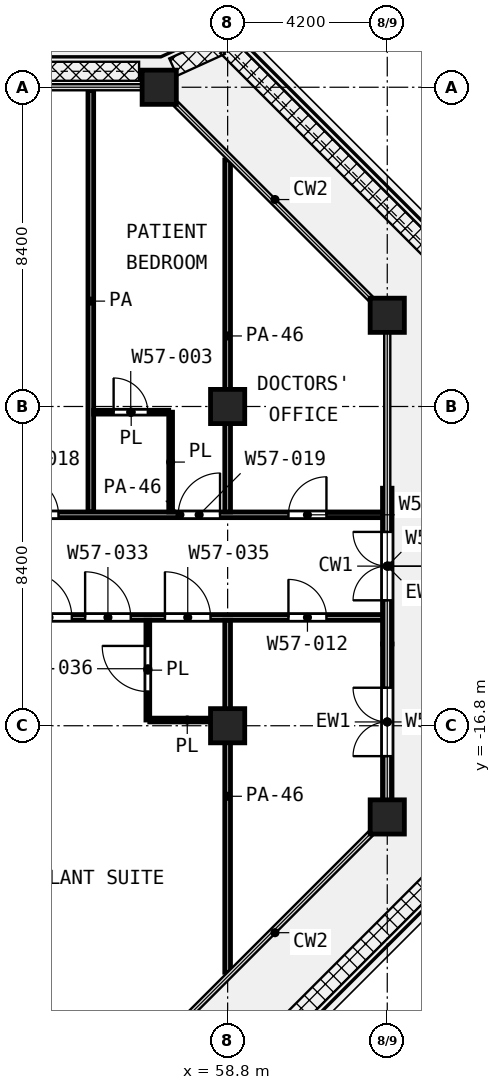
"""IFC4 building model, lengths in metres.
Left out: names, types, materials, properties, quantities, classifications, styles, units other than length and angle.
Written with IfcOpenShell. Run it as: python <this file> out.ifc"""

import sys

from ifc_helpers import new_model, si_unit, direction, frame, frame_2d, origin, origin_2d, place, context, subcontext, project, spatial, rectangle, extrude, element, fill, save


model = new_model("IFC4")
c1 = context("Model", 3, precision=1e-05, world=origin(), true_north=direction((0.0, 1.0)))
c2 = subcontext(c1, "Body", "Model", "MODEL_VIEW")
j1 = project(units=[si_unit("LENGTHUNIT", "METRE"), si_unit("PLANEANGLEUNIT", "RADIAN")], contexts=[c1])
p1 = place(None, origin())
s1 = spatial("IfcSite", under=j1, at=p1, CompositionType="ELEMENT")
p2 = place(p1, origin())
s2 = spatial("IfcBuilding", under=s1, at=p2, CompositionType="ELEMENT")
p3 = place(p2, frame((0.0, 0.0, 247.4)))
s3 = spatial("IfcBuildingStorey", under=s2, at=p3, CompositionType="ELEMENT", Elevation=247.4)
for number, where, z_axis, x_axis in (
    (1, (57.0, 0.0, 0.0), (0.0, 0.0, 1.0), (1.0, 0.0, 0.0)),
    (2, (63.0, -6.0, 0.0), (0.0, 0.0, 1.0), (1.0, 0.0, 0.0)),
    (3, (58.8, -8.4, 0.0), (0.0, 0.0, 1.0), (1.0, 0.0, 0.0)),
    (4, (58.8, -16.8, 0.0), (0.0, 0.0, 1.0), (1.0, 0.0, 0.0)),
    (5, (63.0, -19.2, 0.0), (0.0, 0.0, 1.0), (1.0, 0.0, 0.0)),
):
    element("IfcColumn", number, at=place(p3, frame(where, z_axis=z_axis, x_axis=x_axis)), inside=s3, PredefinedType="COLUMN", context=c2, shape_type="SweptSolid", body=[
        extrude(rectangle(XDim=0.9, YDim=0.9, at=origin_2d()), origin(), (0.0, 0.0, 1.0), 4.2),
    ])
p4 = place(p3, frame((63.0, -18.75, 0.0), z_axis=(0.0, 0.0, 1.0), x_axis=(0.0, 1.0, 0.0)))
e6 = element("IfcWall", 6, at=p4, inside=s3, PredefinedType="SOLIDWALL", context=c2, shape_type="SweptSolid", body=[
    extrude(rectangle(XDim=4.1, YDim=0.25, at=frame_2d((2.05, 0.0))), origin(), (0.0, 0.0, 1.0), 2.58),
])
p5 = place(p4, frame((1.15, 0.0, 0.0)))
e7 = element("IfcOpeningElement", 7, at=p5, cuts=e6, PredefinedType="OPENING", context=c2, shape_type="SweptSolid", body=[
    extrude(rectangle(XDim=1.8, YDim=2.1, at=frame_2d((0.9, 1.05))), frame((0.0, 0.135, 0.0), z_axis=(0.0, -1.0, 0.0), x_axis=(1.0, 0.0, 0.0)), (0.0, 0.0, 1.0), 0.27),
])
p6 = place(p3, frame((63.0, -14.65, 0.0), z_axis=(0.0, 0.0, 1.0), x_axis=(0.0, 1.0, 0.0)))
e8 = element("IfcWall", 8, at=p6, inside=s3, PredefinedType="SOLIDWALL", context=c2, shape_type="SweptSolid", body=[
    extrude(rectangle(XDim=4.1, YDim=0.25, at=frame_2d((2.05, 0.0))), origin(), (0.0, 0.0, 1.0), 2.58),
])
p7 = place(p6, frame((1.15, 0.0, 0.0)))
e9 = element("IfcOpeningElement", 9, at=p7, cuts=e8, PredefinedType="OPENING", context=c2, shape_type="SweptSolid", body=[
    extrude(rectangle(XDim=1.8, YDim=2.1, at=frame_2d((0.9, 1.05))), frame((0.0, 0.135, 0.0), z_axis=(0.0, -1.0, 0.0), x_axis=(1.0, 0.0, 0.0)), (0.0, 0.0, 1.0), 0.27),
])
p8 = place(p3, frame((56.75, -16.65, 0.0), z_axis=(0.0, 0.0, 1.0), x_axis=(1.0, 0.0, 0.0)))
e10 = element("IfcWall", 10, at=p8, inside=s3, PredefinedType="PARTITIONING", context=c2, shape_type="SweptSolid", body=[
    extrude(rectangle(XDim=1.975, YDim=0.1, at=frame_2d((0.988, 0.0))), origin(), (0.0, 0.0, 1.0), 3.6),
])
p9 = place(p3, frame((55.275, -8.55, 0.0), z_axis=(0.0, 0.0, 1.0), x_axis=(1.0, 0.0, 0.0)))
e11 = element("IfcWall", 11, at=p9, inside=s3, PredefinedType="PARTITIONING", context=c2, shape_type="SweptSolid", body=[
    extrude(rectangle(XDim=1.975, YDim=0.1, at=frame_2d((0.988, 0.0))), origin(), (0.0, 0.0, 1.0), 3.6),
])
p10 = place(p9, frame((0.525, 0.0, 0.0)))
e12 = element("IfcOpeningElement", 12, at=p10, cuts=e11, PredefinedType="OPENING", context=c2, shape_type="SweptSolid", body=[
    extrude(rectangle(XDim=0.9, YDim=2.1, at=frame_2d((0.45, 1.05))), frame((0.0, 0.06, 0.0), z_axis=(0.0, -1.0, 0.0), x_axis=(1.0, 0.0, 0.0)), (0.0, 0.0, 1.0), 0.12),
])
p11 = place(p3, frame((56.7, -16.65, 0.0), z_axis=(0.0, 0.0, 1.0), x_axis=(0.0, 1.0, 0.0)))
e13 = element("IfcWall", 13, at=p11, inside=s3, PredefinedType="PARTITIONING", context=c2, shape_type="SweptSolid", body=[
    extrude(rectangle(XDim=2.625, YDim=0.1, at=frame_2d((1.312, 0.0))), origin(), (0.0, 0.0, 1.0), 3.6),
])
p12 = place(p11, frame((0.75, 0.0, 0.0)))
e14 = element("IfcOpeningElement", 14, at=p12, cuts=e13, PredefinedType="OPENING", context=c2, shape_type="SweptSolid", body=[
    extrude(rectangle(XDim=1.2, YDim=2.1, at=frame_2d((0.6, 1.05))), frame((0.0, 0.06, 0.0), z_axis=(0.0, -1.0, 0.0), x_axis=(1.0, 0.0, 0.0)), (0.0, 0.0, 1.0), 0.12),
])
p13 = place(p3, frame((57.3, -11.175, 0.0), z_axis=(0.0, 0.0, 1.0), x_axis=(0.0, 1.0, 0.0)))
e15 = element("IfcWall", 15, at=p13, inside=s3, PredefinedType="PARTITIONING", context=c2, shape_type="SweptSolid", body=[
    extrude(rectangle(XDim=2.625, YDim=0.1, at=frame_2d((1.312, 0.0))), origin(), (0.0, 0.0, 1.0), 3.6),
])
p14 = place(p3, frame((29.4, -13.95, 0.0), z_axis=(0.0, 0.0, 1.0), x_axis=(1.0, 0.0, 0.0)))
e16 = element("IfcWall", 16, at=p14, inside=s3, PredefinedType="PARTITIONING", context=c2, shape_type="SweptSolid", body=[
    extrude(rectangle(XDim=33.52, YDim=0.15, at=frame_2d((16.76, 0.0))), origin(), (0.0, 0.0, 1.0), 2.7),
])
p15 = place(p14, frame((1.5, 0.0, 0.0)))
e17 = element("IfcOpeningElement", 17, at=p15, cuts=e16, PredefinedType="OPENING", context=c2, shape_type="SweptSolid", body=[
    extrude(rectangle(XDim=1.2, YDim=2.1, at=frame_2d((0.6, 1.05))), frame((0.0, 0.085, 0.0), z_axis=(0.0, -1.0, 0.0), x_axis=(1.0, 0.0, 0.0)), (0.0, 0.0, 1.0), 0.17),
])
p16 = place(p14, frame((8.85, 0.0, 0.0)))
e18 = element("IfcOpeningElement", 18, at=p16, cuts=e16, PredefinedType="OPENING", context=c2, shape_type="SweptSolid", body=[
    extrude(rectangle(XDim=1.2, YDim=2.1, at=frame_2d((0.6, 1.05))), frame((0.0, 0.085, 0.0), z_axis=(0.0, -1.0, 0.0), x_axis=(1.0, 0.0, 0.0)), (0.0, 0.0, 1.0), 0.17),
])
p17 = place(p14, frame((7.3, 0.0, 0.0)))
e19 = element("IfcOpeningElement", 19, at=p17, cuts=e16, PredefinedType="OPENING", context=c2, shape_type="SweptSolid", body=[
    extrude(rectangle(XDim=1.2, YDim=2.1, at=frame_2d((0.6, 1.05))), frame((0.0, 0.085, 0.0), z_axis=(0.0, -1.0, 0.0), x_axis=(1.0, 0.0, 0.0)), (0.0, 0.0, 1.0), 0.17),
])
p18 = place(p14, frame((10.95, 0.0, 0.0)))
e20 = element("IfcOpeningElement", 20, at=p18, cuts=e16, PredefinedType="OPENING", context=c2, shape_type="SweptSolid", body=[
    extrude(rectangle(XDim=1.2, YDim=2.1, at=frame_2d((0.6, 1.05))), frame((0.0, 0.085, 0.0), z_axis=(0.0, -1.0, 0.0), x_axis=(1.0, 0.0, 0.0)), (0.0, 0.0, 1.0), 0.17),
])
p19 = place(p14, frame((13.8, 0.0, 0.0)))
e21 = element("IfcOpeningElement", 21, at=p19, cuts=e16, PredefinedType="OPENING", context=c2, shape_type="SweptSolid", body=[
    extrude(rectangle(XDim=1.2, YDim=2.1, at=frame_2d((0.6, 1.05))), frame((0.0, 0.085, 0.0), z_axis=(0.0, -1.0, 0.0), x_axis=(1.0, 0.0, 0.0)), (0.0, 0.0, 1.0), 0.17),
])
p20 = place(p14, frame((19.7, 0.0, 0.0)))
e22 = element("IfcOpeningElement", 22, at=p20, cuts=e16, PredefinedType="OPENING", context=c2, shape_type="SweptSolid", body=[
    extrude(rectangle(XDim=1.1, YDim=2.1, at=frame_2d((0.55, 1.05))), frame((0.0, 0.085, 0.0), z_axis=(0.0, -1.0, 0.0), x_axis=(1.0, 0.0, 0.0)), (0.0, 0.0, 1.0), 0.17),
])
p21 = place(p14, frame((25.65, 0.0, 0.0)))
e23 = element("IfcOpeningElement", 23, at=p21, cuts=e16, PredefinedType="OPENING", context=c2, shape_type="SweptSolid", body=[
    extrude(rectangle(XDim=1.2, YDim=2.1, at=frame_2d((0.6, 1.05))), frame((0.0, 0.085, 0.0), z_axis=(0.0, -1.0, 0.0), x_axis=(1.0, 0.0, 0.0)), (0.0, 0.0, 1.0), 0.17),
])
p22 = place(p14, frame((24.1, 0.0, 0.0)))
e24 = element("IfcOpeningElement", 24, at=p22, cuts=e16, PredefinedType="OPENING", context=c2, shape_type="SweptSolid", body=[
    extrude(rectangle(XDim=1.2, YDim=2.1, at=frame_2d((0.6, 1.05))), frame((0.0, 0.085, 0.0), z_axis=(0.0, -1.0, 0.0), x_axis=(1.0, 0.0, 0.0)), (0.0, 0.0, 1.0), 0.17),
])
p23 = place(p14, frame((27.75, 0.0, 0.0)))
e25 = element("IfcOpeningElement", 25, at=p23, cuts=e16, PredefinedType="OPENING", context=c2, shape_type="SweptSolid", body=[
    extrude(rectangle(XDim=1.2, YDim=2.1, at=frame_2d((0.6, 1.05))), frame((0.0, 0.085, 0.0), z_axis=(0.0, -1.0, 0.0), x_axis=(1.0, 0.0, 0.0)), (0.0, 0.0, 1.0), 0.17),
])
p24 = place(p14, frame((31.0, 0.0, 0.0)))
e26 = element("IfcOpeningElement", 26, at=p24, cuts=e16, PredefinedType="OPENING", context=c2, shape_type="SweptSolid", body=[
    extrude(rectangle(XDim=1.0, YDim=2.1, at=frame_2d((0.5, 1.05))), frame((0.0, 0.085, 0.0), z_axis=(0.0, -1.0, 0.0), x_axis=(1.0, 0.0, 0.0)), (0.0, 0.0, 1.0), 0.17),
])
p25 = place(p3, frame((52.168, -11.25, 0.0), z_axis=(0.0, 0.0, 1.0), x_axis=(1.0, 0.0, 0.0)))
e27 = element("IfcWall", 27, at=p25, inside=s3, PredefinedType="PARTITIONING", context=c2, shape_type="SweptSolid", body=[
    extrude(rectangle(XDim=10.752, YDim=0.15, at=frame_2d((5.376, 0.0))), origin(), (0.0, 0.0, 1.0), 2.7),
])
p26 = place(p25, frame((5.332, 0.0, 0.0)))
e28 = element("IfcOpeningElement", 28, at=p26, cuts=e27, PredefinedType="OPENING", context=c2, shape_type="SweptSolid", body=[
    extrude(rectangle(XDim=1.1, YDim=2.1, at=frame_2d((0.55, 1.05))), frame((0.0, 0.085, 0.0), z_axis=(0.0, -1.0, 0.0), x_axis=(1.0, 0.0, 0.0)), (0.0, 0.0, 1.0), 0.17),
])
p27 = place(p25, frame((8.232, 0.0, 0.0)))
e29 = element("IfcOpeningElement", 29, at=p27, cuts=e27, PredefinedType="OPENING", context=c2, shape_type="SweptSolid", body=[
    extrude(rectangle(XDim=1.0, YDim=2.1, at=frame_2d((0.5, 1.05))), frame((0.0, 0.085, 0.0), z_axis=(0.0, -1.0, 0.0), x_axis=(1.0, 0.0, 0.0)), (0.0, 0.0, 1.0), 0.17),
])
p28 = place(p25, frame((1.182, 0.0, 0.0)))
e30 = element("IfcOpeningElement", 30, at=p28, cuts=e27, PredefinedType="OPENING", context=c2, shape_type="SweptSolid", body=[
    extrude(rectangle(XDim=1.0, YDim=2.1, at=frame_2d((0.5, 1.05))), frame((0.0, 0.085, 0.0), z_axis=(0.0, -1.0, 0.0), x_axis=(1.0, 0.0, 0.0)), (0.0, 0.0, 1.0), 0.17),
])
p29 = place(p3, frame((55.2, -11.175, 0.0), z_axis=(0.0, 0.0, 1.0), x_axis=(0.0, 1.0, 0.0)))
e31 = element("IfcWall", 31, at=p29, inside=s3, PredefinedType="PARTITIONING", context=c2, shape_type="SweptSolid", body=[
    extrude(rectangle(XDim=11.095, YDim=0.15, at=frame_2d((5.547, 0.0))), origin(), (0.0, 0.0, 1.0), 3.6),
])
p30 = place(p3, frame((58.8, -23.287, 0.0), z_axis=(0.0, 0.0, 1.0), x_axis=(0.0, 1.0, 0.0)))
e32 = element("IfcWall", 32, at=p30, inside=s3, PredefinedType="PARTITIONING", context=c2, shape_type="SweptSolid", body=[
    extrude(rectangle(XDim=9.262, YDim=0.15, at=frame_2d((4.631, 0.0))), origin(), (0.0, 0.0, 1.0), 2.7),
])
p31 = place(p3, frame((58.8, -11.175, 0.0), z_axis=(0.0, 0.0, 1.0), x_axis=(0.0, 1.0, 0.0)))
e33 = element("IfcWall", 33, at=p31, inside=s3, PredefinedType="PARTITIONING", context=c2, shape_type="SweptSolid", body=[
    extrude(rectangle(XDim=9.262, YDim=0.15, at=frame_2d((4.631, 0.0))), origin(), (0.0, 0.0, 1.0), 2.7),
])
p32 = place(p5, origin())
e34 = element("IfcDoor", 34, at=p32, inside=s3, OperationType="DOUBLE_DOOR_SINGLE_SWING", PredefinedType="DOOR", context=c2, shape_type="SweptSolid", body=[
    extrude(rectangle(XDim=1.8, YDim=2.1, at=frame_2d((0.9, 1.05))), frame((0.0, 0.025, 0.0), z_axis=(0.0, -1.0, 0.0), x_axis=(1.0, 0.0, 0.0)), (0.0, 0.0, 1.0), 0.05),
])
fill(e7, e34)
p33 = place(p7, origin())
e35 = element("IfcDoor", 35, at=p33, inside=s3, OperationType="DOUBLE_DOOR_SINGLE_SWING", PredefinedType="DOOR", context=c2, shape_type="SweptSolid", body=[
    extrude(rectangle(XDim=1.8, YDim=2.1, at=frame_2d((0.9, 1.05))), frame((0.0, 0.025, 0.0), z_axis=(0.0, -1.0, 0.0), x_axis=(1.0, 0.0, 0.0)), (0.0, 0.0, 1.0), 0.05),
])
fill(e9, e35)
p34 = place(p26, origin())
e36 = element("IfcDoor", 36, at=p34, inside=s3, OperationType="SINGLE_SWING_RIGHT", PredefinedType="DOOR", context=c2, shape_type="SweptSolid", body=[
    extrude(rectangle(XDim=1.1, YDim=2.1, at=frame_2d((0.55, 1.05))), frame((0.0, 0.025, 0.0), z_axis=(0.0, -1.0, 0.0), x_axis=(1.0, 0.0, 0.0)), (0.0, 0.0, 1.0), 0.05),
])
fill(e28, e36)
p35 = place(p10, origin())
e37 = element("IfcDoor", 37, at=p35, inside=s3, OperationType="SINGLE_SWING_LEFT", PredefinedType="DOOR", context=c2, shape_type="SweptSolid", body=[
    extrude(rectangle(XDim=0.9, YDim=2.1, at=frame_2d((0.45, 1.05))), frame((0.0, 0.025, 0.0), z_axis=(0.0, -1.0, 0.0), x_axis=(1.0, 0.0, 0.0)), (0.0, 0.0, 1.0), 0.05),
])
fill(e12, e37)
p36 = place(p27, origin())
e38 = element("IfcDoor", 38, at=p36, inside=s3, OperationType="SINGLE_SWING_RIGHT", PredefinedType="DOOR", context=c2, shape_type="SweptSolid", body=[
    extrude(rectangle(XDim=1.0, YDim=2.1, at=frame_2d((0.5, 1.05))), frame((0.0, 0.025, 0.0), z_axis=(0.0, -1.0, 0.0), x_axis=(1.0, 0.0, 0.0)), (0.0, 0.0, 1.0), 0.05),
])
fill(e29, e38)
p37 = place(p21, origin())
e39 = element("IfcDoor", 39, at=p37, inside=s3, OperationType="SINGLE_SWING_LEFT", PredefinedType="DOOR", context=c2, shape_type="SweptSolid", body=[
    extrude(rectangle(XDim=1.2, YDim=2.1, at=frame_2d((0.6, 1.05))), frame((0.0, 0.025, 0.0), z_axis=(0.0, -1.0, 0.0), x_axis=(1.0, 0.0, 0.0)), (0.0, 0.0, 1.0), 0.05),
])
fill(e23, e39)
p38 = place(p22, origin())
e40 = element("IfcDoor", 40, at=p38, inside=s3, OperationType="SINGLE_SWING_LEFT", PredefinedType="DOOR", context=c2, shape_type="SweptSolid", body=[
    extrude(rectangle(XDim=1.2, YDim=2.1, at=frame_2d((0.6, 1.05))), frame((0.0, 0.025, 0.0), z_axis=(0.0, -1.0, 0.0), x_axis=(1.0, 0.0, 0.0)), (0.0, 0.0, 1.0), 0.05),
])
fill(e24, e40)
p39 = place(p23, origin())
e41 = element("IfcDoor", 41, at=p39, inside=s3, OperationType="SINGLE_SWING_LEFT", PredefinedType="DOOR", context=c2, shape_type="SweptSolid", body=[
    extrude(rectangle(XDim=1.2, YDim=2.1, at=frame_2d((0.6, 1.05))), frame((0.0, 0.025, 0.0), z_axis=(0.0, -1.0, 0.0), x_axis=(1.0, 0.0, 0.0)), (0.0, 0.0, 1.0), 0.05),
])
fill(e25, e41)
p40 = place(p12, origin())
e42 = element("IfcDoor", 42, at=p40, inside=s3, OperationType="SINGLE_SWING_RIGHT", PredefinedType="DOOR", context=c2, shape_type="SweptSolid", body=[
    extrude(rectangle(XDim=1.2, YDim=2.1, at=frame_2d((0.6, 1.05))), frame((0.0, 0.025, 0.0), z_axis=(0.0, -1.0, 0.0), x_axis=(1.0, 0.0, 0.0)), (0.0, 0.0, 1.0), 0.05),
])
fill(e14, e42)
p41 = place(p24, origin())
e43 = element("IfcDoor", 43, at=p41, inside=s3, OperationType="SINGLE_SWING_LEFT", PredefinedType="DOOR", context=c2, shape_type="SweptSolid", body=[
    extrude(rectangle(XDim=1.0, YDim=2.1, at=frame_2d((0.5, 1.05))), frame((0.0, 0.025, 0.0), z_axis=(0.0, -1.0, 0.0), x_axis=(1.0, 0.0, 0.0)), (0.0, 0.0, 1.0), 0.05),
])
fill(e26, e43)
p42 = place(p28, origin())
e44 = element("IfcDoor", 44, at=p42, inside=s3, OperationType="SINGLE_SWING_LEFT", PredefinedType="DOOR", context=c2, shape_type="SweptSolid", body=[
    extrude(rectangle(XDim=1.0, YDim=2.1, at=frame_2d((0.5, 1.05))), frame((0.0, 0.025, 0.0), z_axis=(0.0, -1.0, 0.0), x_axis=(1.0, 0.0, 0.0)), (0.0, 0.0, 1.0), 0.05),
])
fill(e30, e44)
save(model, sys.argv[1])
